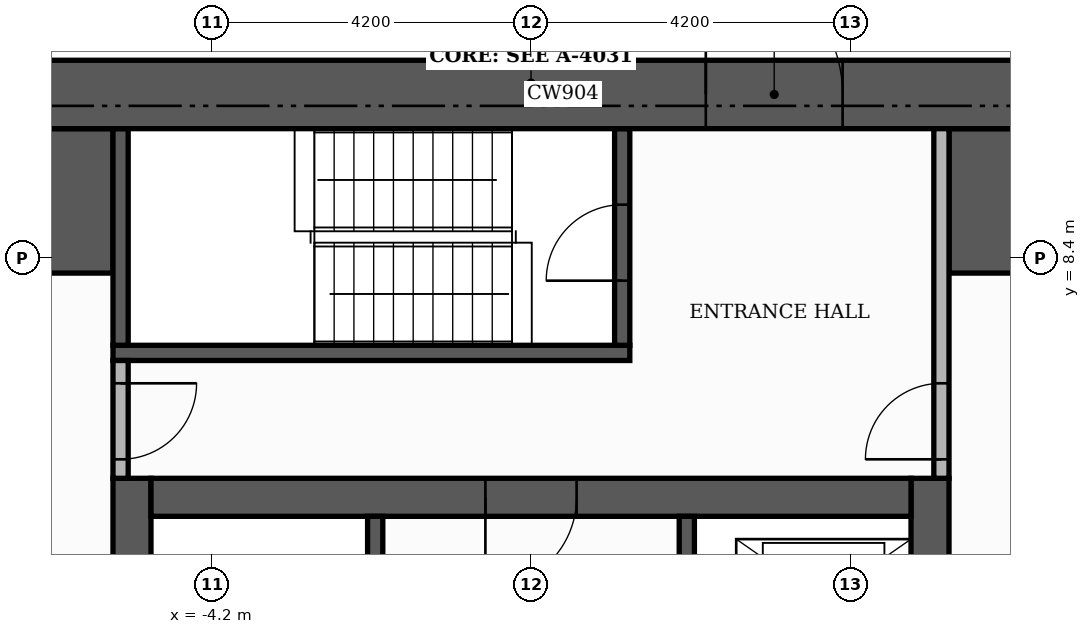
"""IFC4 building model, lengths in metres.
Left out: names, types, materials, properties, quantities, classifications, styles, units other than length and angle.
Written with IfcOpenShell. Run it as: python <this file> out.ifc"""

import sys

from ifc_helpers import new_model, si_unit, direction, frame, frame_2d, origin, place, context, subcontext, project, spatial, rectangle, extrude, element, fill, save


model = new_model("IFC4")
c1 = context("Model", 3, precision=1e-05, world=origin(), true_north=direction((0.0, 1.0)))
c2 = subcontext(c1, "Body", "Model", "MODEL_VIEW")
j1 = project(units=[si_unit("LENGTHUNIT", "METRE"), si_unit("PLANEANGLEUNIT", "RADIAN")], contexts=[c1])
p1 = place(None, origin())
s1 = spatial("IfcSite", under=j1, at=p1, CompositionType="ELEMENT")
p2 = place(p1, origin())
s2 = spatial("IfcBuilding", under=s1, at=p2, CompositionType="ELEMENT")
p3 = place(p2, frame((0.0, 0.0, 188.4)))
s3 = spatial("IfcBuildingStorey", under=s2, at=p3, CompositionType="ELEMENT", Elevation=188.4)
for number, where, z_axis, x_axis in (
    (1, (-5.25, -5.0, 0.0), (0.0, 0.0, 1.0), (0.0, 1.0, 0.0)),
    (2, (5.25, -5.0, 0.0), (0.0, 0.0, 1.0), (0.0, 1.0, 0.0)),
):
    element("IfcWall", number, at=place(p3, frame(where, z_axis=z_axis, x_axis=x_axis)), inside=s3, PredefinedType="SHEAR", context=c2, shape_type="SweptSolid", body=[
        extrude(rectangle(XDim=10.5, YDim=0.5, at=frame_2d((5.25, 0.0))), origin(), (0.0, 0.0, 1.0), 3.48),
    ])
p4 = place(p3, frame((-5.0, 5.25, 0.0), z_axis=(0.0, 0.0, 1.0), x_axis=(1.0, 0.0, 0.0)))
e3 = element("IfcWall", 3, at=p4, inside=s3, PredefinedType="SHEAR", context=c2, shape_type="SweptSolid", body=[
    extrude(rectangle(XDim=10.0, YDim=0.5, at=frame_2d((5.0, 0.0))), origin(), (0.0, 0.0, 1.0), 3.48),
])
p5 = place(p4, frame((4.4, 0.0, 0.0)))
e4 = element("IfcOpeningElement", 4, at=p5, cuts=e3, PredefinedType="OPENING", context=c2, shape_type="SweptSolid", body=[
    extrude(rectangle(XDim=1.2, YDim=2.1, at=frame_2d((0.6, 1.05))), frame((0.0, 0.26, 0.0), z_axis=(0.0, -1.0, 0.0), x_axis=(1.0, 0.0, 0.0)), (0.0, 0.0, 1.0), 0.52),
])
for number, where, z_axis, x_axis in (
    (5, (-10.1, 9.15, 0.0), (0.0, 0.0, 1.0), (1.0, 0.0, 0.0)),
    (6, (5.5, 9.15, 0.0), (0.0, 0.0, 1.0), (1.0, 0.0, 0.0)),
):
    element("IfcWall", number, at=place(p3, frame(where, z_axis=z_axis, x_axis=x_axis)), inside=s3, PredefinedType="SHEAR", context=c2, shape_type="SweptSolid", body=[
        extrude(rectangle(XDim=4.6, YDim=1.9, at=frame_2d((2.3, 0.0))), origin(), (0.0, 0.0, 1.0), 3.48),
    ])
p6 = place(p3, frame((-2.05, -1.4, 0.0), z_axis=(0.0, 0.0, 1.0), x_axis=(0.0, 1.0, 0.0)))
e7 = element("IfcWall", 7, at=p6, inside=s3, PredefinedType="SHEAR", context=c2, shape_type="SweptSolid", body=[
    extrude(rectangle(XDim=6.4, YDim=0.2, at=frame_2d((3.2, 0.0))), origin(), (0.0, 0.0, 1.0), 3.48),
])
p7 = place(p6, frame((0.15, 0.0, 0.0)))
e8 = element("IfcOpeningElement", 8, at=p7, cuts=e7, PredefinedType="OPENING", context=c2, shape_type="SweptSolid", body=[
    extrude(rectangle(XDim=1.0, YDim=2.1, at=frame_2d((0.5, 1.05))), frame((0.0, 0.11, 0.0), z_axis=(0.0, -1.0, 0.0), x_axis=(1.0, 0.0, 0.0)), (0.0, 0.0, 1.0), 0.22),
])
p8 = place(p3, frame((-5.5, 7.15, 0.0), z_axis=(0.0, 0.0, 1.0), x_axis=(1.0, 0.0, 0.0)))
e9 = element("IfcWall", 9, at=p8, inside=s3, PredefinedType="SHEAR", context=c2, shape_type="SweptSolid", body=[
    extrude(rectangle(XDim=6.8, YDim=0.2, at=frame_2d((3.4, 0.0))), origin(), (0.0, 0.0, 1.0), 3.48),
])
p9 = place(p3, frame((-5.4, 7.25, 0.0), z_axis=(0.0, 0.0, 1.0), x_axis=(0.0, 1.0, 0.0)))
e10 = element("IfcWall", 10, at=p9, inside=s3, PredefinedType="SHEAR", context=c2, shape_type="SweptSolid", body=[
    extrude(rectangle(XDim=2.85, YDim=0.2, at=frame_2d((1.425, 0.0))), origin(), (0.0, 0.0, 1.0), 3.48),
])
p10 = place(p3, frame((1.2, 7.25, 0.0), z_axis=(0.0, 0.0, 1.0), x_axis=(0.0, 1.0, 0.0)))
e11 = element("IfcWall", 11, at=p10, inside=s3, PredefinedType="SHEAR", context=c2, shape_type="SweptSolid", body=[
    extrude(rectangle(XDim=2.85, YDim=0.2, at=frame_2d((1.425, 0.0))), origin(), (0.0, 0.0, 1.0), 3.48),
])
p11 = place(p10, frame((0.85, 0.0, 0.0)))
e12 = element("IfcOpeningElement", 12, at=p11, cuts=e11, PredefinedType="OPENING", context=c2, shape_type="SweptSolid", body=[
    extrude(rectangle(XDim=1.0, YDim=2.1, at=frame_2d((0.5, 1.05))), frame((0.0, 0.11, 0.0), z_axis=(0.0, -1.0, 0.0), x_axis=(1.0, 0.0, 0.0)), (0.0, 0.0, 1.0), 0.22),
])
p12 = place(p3, frame((2.05, 1.6, 0.0), z_axis=(0.0, 0.0, 1.0), x_axis=(0.0, 1.0, 0.0)))
e13 = element("IfcWall", 13, at=p12, inside=s3, PredefinedType="SHEAR", context=c2, shape_type="SweptSolid", body=[
    extrude(rectangle(XDim=3.4, YDim=0.2, at=frame_2d((1.7, 0.0))), origin(), (0.0, 0.0, 1.0), 3.48),
])
p13 = place(p12, frame((1.75, 0.0, 0.0)))
e14 = element("IfcOpeningElement", 14, at=p13, cuts=e13, PredefinedType="OPENING", context=c2, shape_type="SweptSolid", body=[
    extrude(rectangle(XDim=1.1, YDim=2.1, at=frame_2d((0.55, 1.05))), frame((0.0, 0.11, 0.0), z_axis=(0.0, -1.0, 0.0), x_axis=(1.0, 0.0, 0.0)), (0.0, 0.0, 1.0), 0.22),
])
p14 = place(p12, frame((0.15, 0.0, 0.0)))
e15 = element("IfcOpeningElement", 15, at=p14, cuts=e13, PredefinedType="OPENING", context=c2, shape_type="SweptSolid", body=[
    extrude(rectangle(XDim=0.8, YDim=2.1, at=frame_2d((0.4, 1.05))), frame((0.0, 0.11, 0.0), z_axis=(0.0, -1.0, 0.0), x_axis=(1.0, 0.0, 0.0)), (0.0, 0.0, 1.0), 0.22),
])
p15 = place(p3, frame((-11.0, 10.55, 0.0), z_axis=(0.0, 0.0, 1.0), x_axis=(1.0, 0.0, 0.0)))
e16 = element("IfcWall", 16, at=p15, inside=s3, PredefinedType="SHEAR", context=c2, shape_type="SweptSolid", body=[
    extrude(rectangle(XDim=22.0, YDim=0.9, at=frame_2d((11.0, 0.0))), origin(), (0.0, 0.0, 1.0), 3.48),
])
p16 = place(p15, frame((13.3, 0.0, 0.0)))
e17 = element("IfcOpeningElement", 17, at=p16, cuts=e16, PredefinedType="OPENING", context=c2, shape_type="SweptSolid", body=[
    extrude(rectangle(XDim=1.8, YDim=2.2, at=frame_2d((0.9, 1.1))), frame((0.0, 0.46, 0.0), z_axis=(0.0, -1.0, 0.0), x_axis=(1.0, 0.0, 0.0)), (0.0, 0.0, 1.0), 0.92),
])
p17 = place(p3, frame((-5.4, 5.5, 0.0), z_axis=(0.0, 0.0, 1.0), x_axis=(0.0, 1.0, 0.0)))
e18 = element("IfcWall", 18, at=p17, inside=s3, PredefinedType="PARTITIONING", context=c2, shape_type="SweptSolid", body=[
    extrude(rectangle(XDim=1.55, YDim=0.2, at=frame_2d((0.775, 0.0))), origin(), (0.0, 0.0, 1.0), 3.48),
])
p18 = place(p17, frame((0.25, 0.0, 0.0)))
e19 = element("IfcOpeningElement", 19, at=p18, cuts=e18, PredefinedType="OPENING", context=c2, shape_type="SweptSolid", body=[
    extrude(rectangle(XDim=1.0, YDim=2.1, at=frame_2d((0.5, 1.05))), frame((0.0, 0.11, 0.0), z_axis=(0.0, -1.0, 0.0), x_axis=(1.0, 0.0, 0.0)), (0.0, 0.0, 1.0), 0.22),
])
p19 = place(p3, frame((5.4, 5.5, 0.0), z_axis=(0.0, 0.0, 1.0), x_axis=(0.0, 1.0, 0.0)))
e20 = element("IfcWall", 20, at=p19, inside=s3, PredefinedType="PARTITIONING", context=c2, shape_type="SweptSolid", body=[
    extrude(rectangle(XDim=4.6, YDim=0.2, at=frame_2d((2.3, 0.0))), origin(), (0.0, 0.0, 1.0), 3.48),
])
p20 = place(p19, frame((0.25, 0.0, 0.0)))
e21 = element("IfcOpeningElement", 21, at=p20, cuts=e20, PredefinedType="OPENING", context=c2, shape_type="SweptSolid", body=[
    extrude(rectangle(XDim=1.0, YDim=2.1, at=frame_2d((0.5, 1.05))), frame((0.0, 0.11, 0.0), z_axis=(0.0, -1.0, 0.0), x_axis=(1.0, 0.0, 0.0)), (0.0, 0.0, 1.0), 0.22),
])
p21 = place(p5, frame((1.2, 0.0, 0.0), z_axis=(0.0, 0.0, 1.0), x_axis=(-1.0, 0.0, 0.0)))
e22 = element("IfcDoor", 22, at=p21, inside=s3, OperationType="SINGLE_SWING_LEFT", PredefinedType="DOOR", context=c2, shape_type="SweptSolid", body=[
    extrude(rectangle(XDim=1.2, YDim=2.1, at=frame_2d((0.6, 1.05))), frame((0.0, 0.025, 0.0), z_axis=(0.0, -1.0, 0.0), x_axis=(1.0, 0.0, 0.0)), (0.0, 0.0, 1.0), 0.05),
])
fill(e4, e22)
p22 = place(p11, origin())
e23 = element("IfcDoor", 23, at=p22, inside=s3, OperationType="SINGLE_SWING_LEFT", PredefinedType="DOOR", context=c2, shape_type="SweptSolid", body=[
    extrude(rectangle(XDim=1.0, YDim=2.1, at=frame_2d((0.5, 1.05))), frame((0.0, 0.025, 0.0), z_axis=(0.0, -1.0, 0.0), x_axis=(1.0, 0.0, 0.0)), (0.0, 0.0, 1.0), 0.05),
])
fill(e12, e23)
p23 = place(p18, frame((1.0, 0.0, 0.0), z_axis=(0.0, 0.0, 1.0), x_axis=(-1.0, 0.0, 0.0)))
e24 = element("IfcDoor", 24, at=p23, inside=s3, OperationType="SINGLE_SWING_RIGHT", PredefinedType="DOOR", context=c2, shape_type="SweptSolid", body=[
    extrude(rectangle(XDim=1.0, YDim=2.1, at=frame_2d((0.5, 1.05))), frame((0.0, 0.025, 0.0), z_axis=(0.0, -1.0, 0.0), x_axis=(1.0, 0.0, 0.0)), (0.0, 0.0, 1.0), 0.05),
])
fill(e19, e24)
p24 = place(p20, origin())
e25 = element("IfcDoor", 25, at=p24, inside=s3, OperationType="SINGLE_SWING_LEFT", PredefinedType="DOOR", context=c2, shape_type="SweptSolid", body=[
    extrude(rectangle(XDim=1.0, YDim=2.1, at=frame_2d((0.5, 1.05))), frame((0.0, 0.025, 0.0), z_axis=(0.0, -1.0, 0.0), x_axis=(1.0, 0.0, 0.0)), (0.0, 0.0, 1.0), 0.05),
])
fill(e21, e25)
p25 = place(p16, origin())
e26 = element("IfcDoor", 26, at=p25, inside=s3, OperationType="DOUBLE_DOOR_SINGLE_SWING", PredefinedType="DOOR", context=c2, shape_type="SweptSolid", body=[
    extrude(rectangle(XDim=1.8, YDim=2.2, at=frame_2d((0.9, 1.1))), frame((0.0, 0.025, 0.0), z_axis=(0.0, -1.0, 0.0), x_axis=(1.0, 0.0, 0.0)), (0.0, 0.0, 1.0), 0.05),
])
fill(e17, e26)
save(model, sys.argv[1])
